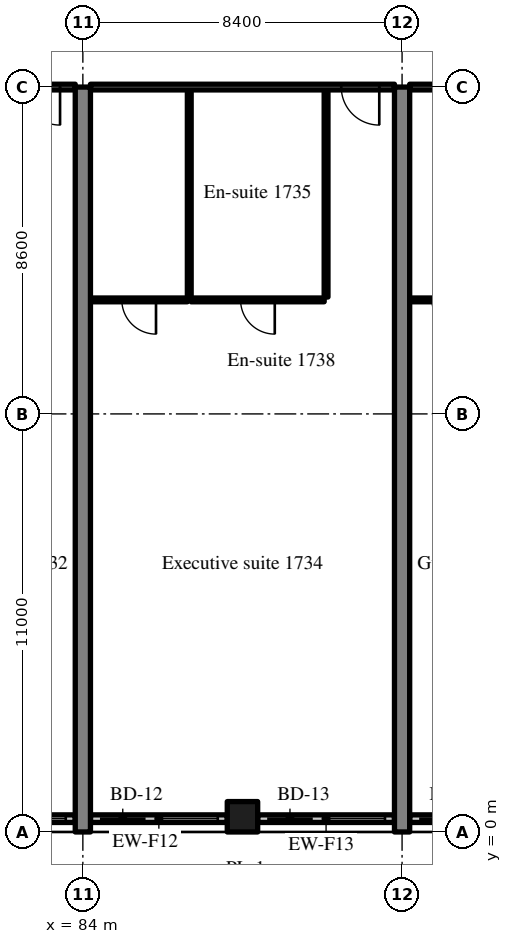
"""IFC4 building model, lengths in metres.
Left out: names, types, materials, properties, quantities, classifications, styles, units other than length and angle.
Written with IfcOpenShell. Run it as: python <this file> out.ifc"""

import sys

from ifc_helpers import new_model, si_unit, direction, frame, frame_2d, origin, origin_2d, place, context, subcontext, project, spatial, rectangle, extrude, source, transform, mapped, element, fill, save


model = new_model("IFC4")
c1 = context("Model", 3, precision=1e-05, world=origin(), true_north=direction((0.0, 1.0)))
c2 = subcontext(c1, "Body", "Model", "MODEL_VIEW")
j1 = project(units=[si_unit("LENGTHUNIT", "METRE"), si_unit("PLANEANGLEUNIT", "RADIAN")], contexts=[c1])
p1 = place(None, origin())
s1 = spatial("IfcSite", under=j1, at=p1, CompositionType="ELEMENT")
p2 = place(p1, origin())
s2 = spatial("IfcBuilding", under=s1, at=p2, CompositionType="ELEMENT")
p3 = place(p2, frame((0.0, 0.0, 73.4)))
s3 = spatial("IfcBuildingStorey", under=s2, at=p3, CompositionType="ELEMENT", Elevation=73.4)
m1 = source(origin(), c2, "Body", "SweptSolid", [
    extrude(rectangle(XDim=19.6, YDim=0.4, at=frame_2d((9.8, 0.0))), origin(), (0.0, 0.0, 1.0), 3.52),
])
for number, where, z_axis, x_axis in (
    (1, (84.0, 0.0, 0.0), (0.0, 0.0, 1.0), (0.0, 1.0, 0.0)),
    (2, (92.4, 0.0, 0.0), (0.0, 0.0, 1.0), (0.0, 1.0, 0.0)),
):
    element("IfcWall", number, at=place(p3, frame(where, z_axis=z_axis, x_axis=x_axis)), inside=s3, PredefinedType="SHEAR", context=c2, shape_type="MappedRepresentation", body=[
        mapped(m1, transform((0.0, 0.0, 0.0), scale=1.0)),
    ])
m2 = source(origin(), c2, "Body", "SweptSolid", [
    extrude(rectangle(XDim=0.8, YDim=0.8, at=origin_2d()), origin(), (0.0, 0.0, 1.0), 3.52),
])
p4 = place(p3, frame((88.2, 0.4, 0.0), z_axis=(0.0, 0.0, 1.0), x_axis=(1.0, 0.0, 0.0)))
e3 = element("IfcColumn", 3, at=p4, inside=s3, PredefinedType="COLUMN", context=c2, shape_type="MappedRepresentation", body=[
    mapped(m2, transform((0.0, 0.0, 0.0), scale=1.0)),
])
m3 = source(origin(), c2, "Body", "SweptSolid", [
    extrude(rectangle(XDim=3.6, YDim=0.2, at=frame_2d((1.8, 0.0))), origin(), (0.0, 0.0, 1.0), 2.82),
])
p5 = place(p3, frame((80.2, 0.35, 0.0), z_axis=(0.0, 0.0, 1.0), x_axis=(1.0, 0.0, 0.0)))
e4 = element("IfcWall", 4, at=p5, inside=s3, PredefinedType="SOLIDWALL", context=c2, shape_type="MappedRepresentation", body=[
    mapped(m3, transform((0.0, 0.0, 0.0), scale=1.0)),
])
m4 = source(origin(), c2, "Body", "SweptSolid", [
    extrude(rectangle(XDim=1.2, YDim=2.4, at=frame_2d((0.6, 1.2))), frame((0.0, 0.11, 0.0), z_axis=(0.0, -1.0, 0.0), x_axis=(1.0, 0.0, 0.0)), (0.0, 0.0, 1.0), 0.22),
])
p6 = place(p5, frame((0.25, 0.0, 0.0)))
e5 = element("IfcOpeningElement", 5, at=p6, cuts=e4, PredefinedType="OPENING", context=c2, shape_type="MappedRepresentation", body=[
    mapped(m4, transform((0.0, 0.0, 0.0), scale=1.0)),
])
m5 = source(origin(), c2, "Body", "SweptSolid", [
    extrude(rectangle(XDim=1.5, YDim=1.5, at=frame_2d((0.75, 0.75))), frame((0.0, 0.11, 0.0), z_axis=(0.0, -1.0, 0.0), x_axis=(1.0, 0.0, 0.0)), (0.0, 0.0, 1.0), 0.22),
])
p7 = place(p5, frame((1.85, 0.0, 0.9)))
e6 = element("IfcOpeningElement", 6, at=p7, cuts=e4, PredefinedType="OPENING", context=c2, shape_type="MappedRepresentation", body=[
    mapped(m5, transform((0.0, 0.0, 0.0), scale=1.0)),
])
p8 = place(p3, frame((84.2, 0.35, 0.0), z_axis=(0.0, 0.0, 1.0), x_axis=(1.0, 0.0, 0.0)))
e7 = element("IfcWall", 7, at=p8, inside=s3, PredefinedType="SOLIDWALL", context=c2, shape_type="MappedRepresentation", body=[
    mapped(m3, transform((0.0, 0.0, 0.0), scale=1.0)),
])
p9 = place(p8, frame((0.25, 0.0, 0.0)))
e8 = element("IfcOpeningElement", 8, at=p9, cuts=e7, PredefinedType="OPENING", context=c2, shape_type="MappedRepresentation", body=[
    mapped(m4, transform((0.0, 0.0, 0.0), scale=1.0)),
])
p10 = place(p8, frame((1.85, 0.0, 0.9)))
e9 = element("IfcOpeningElement", 9, at=p10, cuts=e7, PredefinedType="OPENING", context=c2, shape_type="MappedRepresentation", body=[
    mapped(m5, transform((0.0, 0.0, 0.0), scale=1.0)),
])
m6 = source(origin(), c2, "Body", "SweptSolid", [
    extrude(rectangle(XDim=3.6, YDim=0.2, at=frame_2d((1.8, 0.0))), origin(), (0.0, 0.0, 1.0), 2.82),
])
p11 = place(p3, frame((88.6, 0.35, 0.0), z_axis=(0.0, 0.0, 1.0), x_axis=(1.0, 0.0, 0.0)))
e10 = element("IfcWall", 10, at=p11, inside=s3, PredefinedType="SOLIDWALL", context=c2, shape_type="MappedRepresentation", body=[
    mapped(m6, transform((0.0, 0.0, 0.0), scale=1.0)),
])
p12 = place(p11, frame((0.25, 0.0, 0.0)))
e11 = element("IfcOpeningElement", 11, at=p12, cuts=e10, PredefinedType="OPENING", context=c2, shape_type="MappedRepresentation", body=[
    mapped(m4, transform((0.0, 0.0, 0.0), scale=1.0)),
])
p13 = place(p11, frame((1.85, 0.0, 0.9)))
e12 = element("IfcOpeningElement", 12, at=p13, cuts=e10, PredefinedType="OPENING", context=c2, shape_type="MappedRepresentation", body=[
    mapped(m5, transform((0.0, 0.0, 0.0), scale=1.0)),
])
m7 = source(origin(), c2, "Body", "SweptSolid", [
    extrude(rectangle(XDim=4.055, YDim=0.2, at=frame_2d((2.027, 0.0))), origin(), (0.0, 0.0, 1.0), 2.82),
])
p14 = place(p3, frame((92.6, 0.35, 0.0), z_axis=(0.0, 0.0, 1.0), x_axis=(1.0, 0.0, 0.0)))
e13 = element("IfcWall", 13, at=p14, inside=s3, PredefinedType="SOLIDWALL", context=c2, shape_type="MappedRepresentation", body=[
    mapped(m7, transform((0.0, 0.0, 0.0), scale=1.0)),
])
p15 = place(p14, frame((0.25, 0.0, 0.0)))
e14 = element("IfcOpeningElement", 14, at=p15, cuts=e13, PredefinedType="OPENING", context=c2, shape_type="MappedRepresentation", body=[
    mapped(m4, transform((0.0, 0.0, 0.0), scale=1.0)),
])
p16 = place(p14, frame((2.305, 0.0, 0.9)))
e15 = element("IfcOpeningElement", 15, at=p16, cuts=e13, PredefinedType="OPENING", context=c2, shape_type="MappedRepresentation", body=[
    mapped(m5, transform((0.0, 0.0, 0.0), scale=1.0)),
])
m8 = source(origin(), c2, "Body", "SweptSolid", [
    extrude(rectangle(XDim=3.925, YDim=0.15, at=frame_2d((1.962, 0.0))), origin(), (0.0, 0.0, 1.0), 2.82),
])
p17 = place(p3, frame((79.875, 19.6, 0.0), z_axis=(0.0, 0.0, 1.0), x_axis=(1.0, 0.0, 0.0)))
e16 = element("IfcWall", 16, at=p17, inside=s3, PredefinedType="PARTITIONING", context=c2, shape_type="MappedRepresentation", body=[
    mapped(m8, transform((0.0, 0.0, 0.0), scale=1.0)),
])
m9 = source(origin(), c2, "Body", "SweptSolid", [
    extrude(rectangle(XDim=1.0, YDim=2.1, at=frame_2d((0.5, 1.05))), frame((0.0, 0.085, 0.0), z_axis=(0.0, -1.0, 0.0), x_axis=(1.0, 0.0, 0.0)), (0.0, 0.0, 1.0), 0.17),
])
p18 = place(p17, frame((2.525, 0.0, 0.0)))
e17 = element("IfcOpeningElement", 17, at=p18, cuts=e16, PredefinedType="OPENING", context=c2, shape_type="MappedRepresentation", body=[
    mapped(m9, transform((0.0, 0.0, 0.0), scale=1.0)),
])
m10 = source(origin(), c2, "Body", "SweptSolid", [
    extrude(rectangle(XDim=5.45, YDim=0.1, at=frame_2d((2.725, 0.0))), origin(), (0.0, 0.0, 1.0), 3.52),
])
for number, where, z_axis, x_axis in (
    (18, (90.4, 14.075, 0.0), (0.0, 0.0, 1.0), (0.0, 1.0, 0.0)),
    (19, (86.8, 14.075, 0.0), (0.0, 0.0, 1.0), (0.0, 1.0, 0.0)),
):
    element("IfcWall", number, at=place(p3, frame(where, z_axis=z_axis, x_axis=x_axis)), inside=s3, PredefinedType="PARTITIONING", context=c2, shape_type="MappedRepresentation", body=[
        mapped(m10, transform((0.0, 0.0, 0.0), scale=1.0)),
    ])
m11 = source(origin(), c2, "Body", "SweptSolid", [
    extrude(rectangle(XDim=3.5, YDim=0.1, at=frame_2d((1.75, 0.0))), origin(), (0.0, 0.0, 1.0), 3.52),
])
p19 = place(p3, frame((86.85, 14.0, 0.0), z_axis=(0.0, 0.0, 1.0), x_axis=(1.0, 0.0, 0.0)))
e20 = element("IfcWall", 20, at=p19, inside=s3, PredefinedType="PARTITIONING", context=c2, shape_type="MappedRepresentation", body=[
    mapped(m11, transform((0.0, 0.0, 0.0), scale=1.0)),
])
m12 = source(origin(), c2, "Body", "SweptSolid", [
    extrude(rectangle(XDim=0.9, YDim=2.1, at=frame_2d((0.45, 1.05))), frame((0.0, 0.06, 0.0), z_axis=(0.0, -1.0, 0.0), x_axis=(1.0, 0.0, 0.0)), (0.0, 0.0, 1.0), 0.12),
])
p20 = place(p19, frame((1.3, 0.0, 0.0)))
e21 = element("IfcOpeningElement", 21, at=p20, cuts=e20, PredefinedType="OPENING", context=c2, shape_type="MappedRepresentation", body=[
    mapped(m12, transform((0.0, 0.0, 0.0), scale=1.0)),
])
m13 = source(origin(), c2, "Body", "SweptSolid", [
    extrude(rectangle(XDim=2.55, YDim=0.1, at=frame_2d((1.275, 0.0))), origin(), (0.0, 0.0, 1.0), 3.52),
])
p21 = place(p3, frame((84.2, 14.0, 0.0), z_axis=(0.0, 0.0, 1.0), x_axis=(1.0, 0.0, 0.0)))
e22 = element("IfcWall", 22, at=p21, inside=s3, PredefinedType="PARTITIONING", context=c2, shape_type="MappedRepresentation", body=[
    mapped(m13, transform((0.0, 0.0, 0.0), scale=1.0)),
])
p22 = place(p21, frame((0.825, 0.0, 0.0)))
e23 = element("IfcOpeningElement", 23, at=p22, cuts=e22, PredefinedType="OPENING", context=c2, shape_type="MappedRepresentation", body=[
    mapped(m12, transform((0.0, 0.0, 0.0), scale=1.0)),
])
m14 = source(origin(), c2, "Body", "SweptSolid", [
    extrude(rectangle(XDim=8.0, YDim=0.15, at=frame_2d((4.0, 0.0))), origin(), (0.0, 0.0, 1.0), 2.82),
])
p23 = place(p3, frame((84.2, 19.6, 0.0), z_axis=(0.0, 0.0, 1.0), x_axis=(1.0, 0.0, 0.0)))
e24 = element("IfcWall", 24, at=p23, inside=s3, PredefinedType="PARTITIONING", context=c2, shape_type="MappedRepresentation", body=[
    mapped(m14, transform((0.0, 0.0, 0.0), scale=1.0)),
])
p24 = place(p23, frame((6.6, 0.0, 0.0)))
e25 = element("IfcOpeningElement", 25, at=p24, cuts=e24, PredefinedType="OPENING", context=c2, shape_type="MappedRepresentation", body=[
    mapped(m9, transform((0.0, 0.0, 0.0), scale=1.0)),
])
m15 = source(origin(), c2, "Body", "SweptSolid", [
    extrude(rectangle(XDim=2.075, YDim=0.1, at=frame_2d((1.038, 0.0))), origin(), (0.0, 0.0, 1.0), 3.52),
])
p25 = place(p3, frame((92.6, 14.0, 0.0), z_axis=(0.0, 0.0, 1.0), x_axis=(1.0, 0.0, 0.0)))
e26 = element("IfcWall", 26, at=p25, inside=s3, PredefinedType="PARTITIONING", context=c2, shape_type="MappedRepresentation", body=[
    mapped(m15, transform((0.0, 0.0, 0.0), scale=1.0)),
])
p26 = place(p25, frame((0.587, 0.0, 0.0)))
e27 = element("IfcOpeningElement", 27, at=p26, cuts=e26, PredefinedType="OPENING", context=c2, shape_type="MappedRepresentation", body=[
    mapped(m12, transform((0.0, 0.0, 0.0), scale=1.0)),
])
m16 = source(origin(), c2, "Body", "SweptSolid", [
    extrude(rectangle(XDim=3.925, YDim=0.15, at=frame_2d((1.962, 0.0))), origin(), (0.0, 0.0, 1.0), 2.82),
])
p27 = place(p3, frame((92.6, 19.6, 0.0), z_axis=(0.0, 0.0, 1.0), x_axis=(1.0, 0.0, 0.0)))
e28 = element("IfcWall", 28, at=p27, inside=s3, PredefinedType="PARTITIONING", context=c2, shape_type="MappedRepresentation", body=[
    mapped(m16, transform((0.0, 0.0, 0.0), scale=1.0)),
])
p28 = place(p27, frame((2.525, 0.0, 0.0)))
e29 = element("IfcOpeningElement", 29, at=p28, cuts=e28, PredefinedType="OPENING", context=c2, shape_type="MappedRepresentation", body=[
    mapped(m9, transform((0.0, 0.0, 0.0), scale=1.0)),
])
m17 = source(origin(), c2, "Body", "SweptSolid", [
    extrude(rectangle(XDim=1.5, YDim=1.5, at=frame_2d((0.75, 0.75))), frame((0.0, 0.03, 0.0), z_axis=(0.0, -1.0, 0.0), x_axis=(1.0, 0.0, 0.0)), (0.0, 0.0, 1.0), 0.06),
])
p29 = place(p7, origin())
e30 = element("IfcWindow", 30, at=p29, inside=s3, PartitioningType="SINGLE_PANEL", PredefinedType="WINDOW", context=c2, shape_type="MappedRepresentation", body=[
    mapped(m17, transform((0.0, 0.0, 0.0), scale=1.0)),
])
fill(e6, e30)
m18 = source(origin(), c2, "Body", "SweptSolid", [
    extrude(rectangle(XDim=1.2, YDim=2.4, at=frame_2d((0.6, 1.2))), frame((0.0, 0.025, 0.0), z_axis=(0.0, -1.0, 0.0), x_axis=(1.0, 0.0, 0.0)), (0.0, 0.0, 1.0), 0.05),
])
p30 = place(p9, origin())
e31 = element("IfcDoor", 31, at=p30, inside=s3, OperationType="SLIDING_TO_RIGHT", PredefinedType="DOOR", context=c2, shape_type="MappedRepresentation", body=[
    mapped(m18, transform((0.0, 0.0, 0.0), scale=1.0)),
])
fill(e8, e31)
p31 = place(p10, origin())
e32 = element("IfcWindow", 32, at=p31, inside=s3, PartitioningType="SINGLE_PANEL", PredefinedType="WINDOW", context=c2, shape_type="MappedRepresentation", body=[
    mapped(m17, transform((0.0, 0.0, 0.0), scale=1.0)),
])
fill(e9, e32)
p32 = place(p12, origin())
e33 = element("IfcDoor", 33, at=p32, inside=s3, OperationType="SLIDING_TO_LEFT", PredefinedType="DOOR", context=c2, shape_type="MappedRepresentation", body=[
    mapped(m18, transform((0.0, 0.0, 0.0), scale=1.0)),
])
fill(e11, e33)
p33 = place(p13, origin())
e34 = element("IfcWindow", 34, at=p33, inside=s3, PartitioningType="SINGLE_PANEL", PredefinedType="WINDOW", context=c2, shape_type="MappedRepresentation", body=[
    mapped(m17, transform((0.0, 0.0, 0.0), scale=1.0)),
])
fill(e12, e34)
p34 = place(p15, origin())
e35 = element("IfcDoor", 35, at=p34, inside=s3, OperationType="SLIDING_TO_RIGHT", PredefinedType="DOOR", context=c2, shape_type="MappedRepresentation", body=[
    mapped(m18, transform((0.0, 0.0, 0.0), scale=1.0)),
])
fill(e14, e35)
m19 = source(origin(), c2, "Body", "SweptSolid", [
    extrude(rectangle(XDim=1.0, YDim=2.1, at=frame_2d((0.5, 1.05))), frame((0.0, 0.025, 0.0), z_axis=(0.0, -1.0, 0.0), x_axis=(1.0, 0.0, 0.0)), (0.0, 0.0, 1.0), 0.05),
])
p35 = place(p18, origin())
e36 = element("IfcDoor", 36, at=p35, inside=s3, OperationType="SINGLE_SWING_RIGHT", PredefinedType="DOOR", context=c2, shape_type="MappedRepresentation", body=[
    mapped(m19, transform((0.0, 0.0, 0.0), scale=1.0)),
])
fill(e17, e36)
m20 = source(origin(), c2, "Body", "SweptSolid", [
    extrude(rectangle(XDim=0.9, YDim=2.1, at=frame_2d((0.45, 1.05))), frame((0.0, 0.025, 0.0), z_axis=(0.0, -1.0, 0.0), x_axis=(1.0, 0.0, 0.0)), (0.0, 0.0, 1.0), 0.05),
])
p36 = place(p20, origin())
e37 = element("IfcDoor", 37, at=p36, inside=s3, OperationType="SINGLE_SWING_RIGHT", PredefinedType="DOOR", context=c2, shape_type="MappedRepresentation", body=[
    mapped(m20, transform((0.0, 0.0, 0.0), scale=1.0)),
])
fill(e21, e37)
p37 = place(p22, origin())
e38 = element("IfcDoor", 38, at=p37, inside=s3, OperationType="SINGLE_SWING_RIGHT", PredefinedType="DOOR", context=c2, shape_type="MappedRepresentation", body=[
    mapped(m20, transform((0.0, 0.0, 0.0), scale=1.0)),
])
fill(e23, e38)
p38 = place(p24, origin())
e39 = element("IfcDoor", 39, at=p38, inside=s3, OperationType="SINGLE_SWING_RIGHT", PredefinedType="DOOR", context=c2, shape_type="MappedRepresentation", body=[
    mapped(m19, transform((0.0, 0.0, 0.0), scale=1.0)),
])
fill(e25, e39)
p39 = place(p26, origin())
e40 = element("IfcDoor", 40, at=p39, inside=s3, OperationType="SINGLE_SWING_RIGHT", PredefinedType="DOOR", context=c2, shape_type="MappedRepresentation", body=[
    mapped(m20, transform((0.0, 0.0, 0.0), scale=1.0)),
])
fill(e27, e40)
save(model, sys.argv[1])
